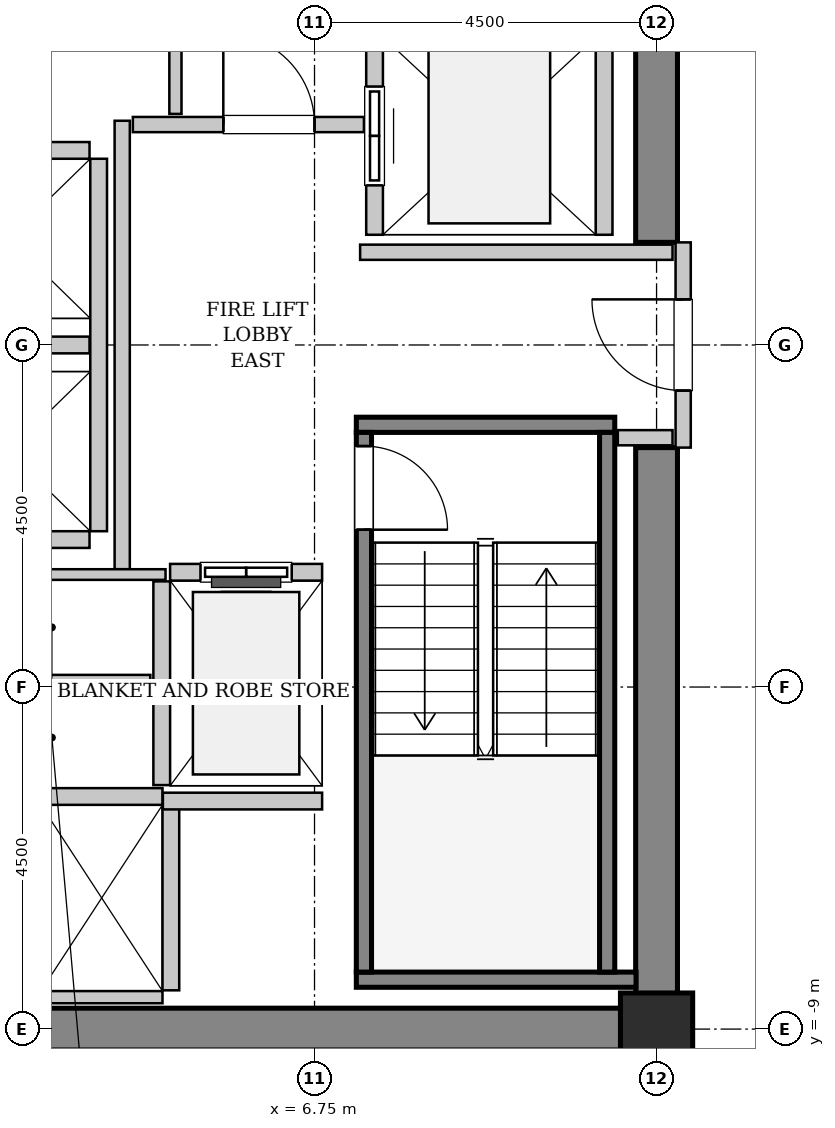
"""IFC4 building model, lengths in metres.
Left out: names, types, materials, properties, quantities, classifications, styles, units other than length and angle.
Written with IfcOpenShell. Run it as: python <this file> out.ifc"""

import sys

from ifc_helpers import new_model, si_unit, direction, frame, frame_2d, origin, origin_2d, place, context, subcontext, project, spatial, rectangle, hollow_rectangle, extrude, source, transform, mapped, element, fill, save


model = new_model("IFC4")
c1 = context("Model", 3, precision=1e-05, world=origin(), true_north=direction((0.0, 1.0)))
c2 = subcontext(c1, "Body", "Model", "MODEL_VIEW")
j1 = project(units=[si_unit("LENGTHUNIT", "METRE"), si_unit("PLANEANGLEUNIT", "RADIAN")], contexts=[c1])
p1 = place(None, origin())
s1 = spatial("IfcSite", under=j1, at=p1, CompositionType="ELEMENT")
p2 = place(p1, origin())
s2 = spatial("IfcBuilding", under=s1, at=p2, CompositionType="ELEMENT")
p3 = place(p2, frame((0.0, 0.0, 106.0)))
s3 = spatial("IfcBuildingStorey", under=s2, at=p3, CompositionType="ELEMENT", Elevation=106.0)
m1 = source(origin(), c2, "Body", "SweptSolid", [
    extrude(rectangle(XDim=9.975, YDim=0.55, at=frame_2d((4.987, 0.0))), origin(), (0.0, 0.0, 1.0), 3.8),
])
p4 = place(p3, frame((1.55, -9.0, 0.0), z_axis=(0.0, 0.0, 1.0), x_axis=(1.0, 0.0, 0.0)))
e1 = element("IfcWall", 1, at=p4, inside=s3, PredefinedType="SHEAR", context=c2, shape_type="MappedRepresentation", body=[
    mapped(m1, transform((0.0, 0.0, 0.0), x_axis=(1.0, 0.0, 0.0), y_axis=(0.0, 1.0, 0.0), z_axis=(0.0, 0.0, 1.0), scale=1.0)),
])
m2 = source(origin(), c2, "Body", "SweptSolid", [
    extrude(rectangle(XDim=7.375, YDim=0.55, at=frame_2d((3.688, 0.0))), origin(), (0.0, 0.0, 1.0), 3.8),
])
for number, where, z_axis, x_axis in (
    (2, (11.25, -8.725, 0.0), (0.0, 0.0, 1.0), (0.0, 1.0, 0.0)),
    (3, (11.25, 1.35, 0.0), (0.0, 0.0, 1.0), (0.0, 1.0, 0.0)),
):
    element("IfcWall", number, at=place(p3, frame(where, z_axis=z_axis, x_axis=x_axis)), inside=s3, PredefinedType="SHEAR", context=c2, shape_type="MappedRepresentation", body=[
        mapped(m2, transform((0.0, 0.0, 0.0), x_axis=(1.0, 0.0, 0.0), y_axis=(0.0, 1.0, 0.0), z_axis=(0.0, 0.0, 1.0), scale=1.0)),
    ])
m3 = source(origin(), c2, "Body", "SweptSolid", [
    extrude(hollow_rectangle(XDim=0.95, YDim=0.95, WallThickness=0.045, InnerFilletRadius=0.045, OuterFilletRadius=0.09, at=origin_2d()), origin(), (0.0, 0.0, 1.0), 3.8),
])
p5 = place(p3, frame((11.25, -9.0, 0.0), z_axis=(0.0, 0.0, 1.0), x_axis=(1.0, 0.0, 0.0)))
e4 = element("IfcColumn", 4, at=p5, inside=s3, PredefinedType="COLUMN", context=c2, shape_type="MappedRepresentation", body=[
    mapped(m3, transform((0.0, 0.0, 0.0), x_axis=(1.0, 0.0, 0.0), y_axis=(0.0, 1.0, 0.0), z_axis=(0.0, 0.0, 1.0), scale=1.0)),
])
m4 = source(origin(), c2, "Body", "SweptSolid", [
    extrude(rectangle(XDim=3.4, YDim=0.2, at=frame_2d((1.7, 0.0))), origin(), (0.0, 0.0, 1.0), 3.8),
])
p6 = place(p3, frame((7.3, -1.05, 0.0), z_axis=(0.0, 0.0, 1.0), x_axis=(1.0, 0.0, 0.0)))
e5 = element("IfcWall", 5, at=p6, inside=s3, PredefinedType="SOLIDWALL", context=c2, shape_type="MappedRepresentation", body=[
    mapped(m4, transform((0.0, 0.0, 0.0), x_axis=(1.0, 0.0, 0.0), y_axis=(0.0, 1.0, 0.0), z_axis=(0.0, 0.0, 1.0), scale=1.0)),
])
m5 = source(origin(), c2, "Body", "SweptSolid", [
    extrude(rectangle(XDim=3.68, YDim=0.2, at=frame_2d((1.84, 0.0))), origin(), (0.0, 0.0, 1.0), 3.8),
])
p7 = place(p3, frame((7.3, -8.35, 0.0), z_axis=(0.0, 0.0, 1.0), x_axis=(1.0, 0.0, 0.0)))
e6 = element("IfcWall", 6, at=p7, inside=s3, PredefinedType="SOLIDWALL", context=c2, shape_type="MappedRepresentation", body=[
    mapped(m5, transform((0.0, 0.0, 0.0), x_axis=(1.0, 0.0, 0.0), y_axis=(0.0, 1.0, 0.0), z_axis=(0.0, 0.0, 1.0), scale=1.0)),
])
m6 = source(origin(), c2, "Body", "SweptSolid", [
    extrude(rectangle(XDim=7.1, YDim=0.2, at=frame_2d((3.55, 0.0))), origin(), (0.0, 0.0, 1.0), 3.8),
])
p8 = place(p3, frame((7.4, -1.15, 0.0), z_axis=(0.0, 0.0, 1.0), x_axis=(0.0, -1.0, 0.0)))
e7 = element("IfcWall", 7, at=p8, inside=s3, PredefinedType="SOLIDWALL", context=c2, shape_type="MappedRepresentation", body=[
    mapped(m6, transform((0.0, 0.0, 0.0), x_axis=(1.0, 0.0, 0.0), y_axis=(0.0, 1.0, 0.0), z_axis=(0.0, 0.0, 1.0), scale=1.0)),
])
p9 = place(p8, frame((0.18, 0.0, 0.0)))
e8 = element("IfcOpeningElement", 8, at=p9, cuts=e7, PredefinedType="OPENING", context=c2, shape_type="SweptSolid", body=[
    extrude(rectangle(XDim=1.1, YDim=2.15, at=frame_2d((0.55, 1.075))), frame((0.0, 0.11, 0.0), z_axis=(0.0, -1.0, 0.0), x_axis=(1.0, 0.0, 0.0)), (0.0, 0.0, 1.0), 0.22),
])
p10 = place(p3, frame((10.6, -1.15, 0.0), z_axis=(0.0, 0.0, 1.0), x_axis=(0.0, -1.0, 0.0)))
e9 = element("IfcWall", 9, at=p10, inside=s3, PredefinedType="SOLIDWALL", context=c2, shape_type="MappedRepresentation", body=[
    mapped(m6, transform((0.0, 0.0, 0.0), x_axis=(1.0, 0.0, 0.0), y_axis=(0.0, 1.0, 0.0), z_axis=(0.0, 0.0, 1.0), scale=1.0)),
])
m7 = source(origin(), c2, "Body", "SweptSolid", [
    extrude(rectangle(XDim=2.0, YDim=0.22, at=frame_2d((1.0, 0.0))), origin(), (0.0, 0.0, 1.0), 3.535),
])
p11 = place(p3, frame((6.85, -2.99, 0.0), z_axis=(0.0, 0.0, 1.0), x_axis=(-1.0, 0.0, 0.0)))
e10 = element("IfcWall", 10, at=p11, inside=s3, PredefinedType="SOLIDWALL", context=c2, shape_type="MappedRepresentation", body=[
    mapped(m7, transform((0.0, 0.0, 0.0), x_axis=(1.0, 0.0, 0.0), y_axis=(0.0, 1.0, 0.0), z_axis=(0.0, 0.0, 1.0), scale=1.0)),
])
p12 = place(p11, frame((0.4, 0.0, 0.0)))
e11 = element("IfcOpeningElement", 11, at=p12, cuts=e10, PredefinedType="OPENING", context=c2, shape_type="SweptSolid", body=[
    extrude(rectangle(XDim=1.2, YDim=2.2, at=frame_2d((0.6, 1.1))), frame((0.0, 0.12, 0.0), z_axis=(0.0, -1.0, 0.0), x_axis=(1.0, 0.0, 0.0)), (0.0, 0.0, 1.0), 0.24),
])
m8 = source(origin(), c2, "Body", "SweptSolid", [
    extrude(rectangle(XDim=2.68, YDim=0.22, at=frame_2d((1.34, 0.0))), origin(), (0.0, 0.0, 1.0), 3.535),
])
p13 = place(p3, frame((4.74, -3.11, 0.0), z_axis=(0.0, 0.0, 1.0), x_axis=(0.0, -1.0, 0.0)))
e12 = element("IfcWall", 12, at=p13, inside=s3, PredefinedType="SOLIDWALL", context=c2, shape_type="MappedRepresentation", body=[
    mapped(m8, transform((0.0, 0.0, 0.0), x_axis=(1.0, 0.0, 0.0), y_axis=(0.0, 1.0, 0.0), z_axis=(0.0, 0.0, 1.0), scale=1.0)),
])
m9 = source(origin(), c2, "Body", "SweptSolid", [
    extrude(rectangle(XDim=5.45, YDim=0.22, at=frame_2d((2.725, 0.0))), origin(), (0.0, 0.0, 1.0), 3.535),
])
p14 = place(p3, frame((7.54, 6.9, 0.0), z_axis=(0.0, 0.0, 1.0), x_axis=(0.0, -1.0, 0.0)))
e13 = element("IfcWall", 13, at=p14, inside=s3, PredefinedType="SOLIDWALL", context=c2, shape_type="MappedRepresentation", body=[
    mapped(m9, transform((0.0, 0.0, 0.0), x_axis=(1.0, 0.0, 0.0), y_axis=(0.0, 1.0, 0.0), z_axis=(0.0, 0.0, 1.0), scale=1.0)),
])
p15 = place(p14, frame((3.5, 0.0, 0.0)))
e14 = element("IfcOpeningElement", 14, at=p15, cuts=e13, PredefinedType="OPENING", context=c2, shape_type="SweptSolid", body=[
    extrude(rectangle(XDim=1.3, YDim=2.3, at=frame_2d((0.65, 1.15))), frame((0.0, 0.12, 0.0), z_axis=(0.0, -1.0, 0.0), x_axis=(1.0, 0.0, 0.0)), (0.0, 0.0, 1.0), 0.24),
])
p16 = place(p14, frame((0.65, 0.0, 0.0)))
e15 = element("IfcOpeningElement", 15, at=p16, cuts=e13, PredefinedType="OPENING", context=c2, shape_type="SweptSolid", body=[
    extrude(rectangle(XDim=1.3, YDim=2.3, at=frame_2d((0.65, 1.15))), frame((0.0, 0.12, 0.0), z_axis=(0.0, -1.0, 0.0), x_axis=(1.0, 0.0, 0.0)), (0.0, 0.0, 1.0), 0.24),
])
p17 = place(p3, frame((10.56, 1.45, 0.0), z_axis=(0.0, 0.0, 1.0), x_axis=(0.0, 1.0, 0.0)))
e16 = element("IfcWall", 16, at=p17, inside=s3, PredefinedType="SOLIDWALL", context=c2, shape_type="MappedRepresentation", body=[
    mapped(m9, transform((0.0, 0.0, 0.0), x_axis=(1.0, 0.0, 0.0), y_axis=(0.0, 1.0, 0.0), z_axis=(0.0, 0.0, 1.0), scale=1.0)),
])
m10 = source(origin(), c2, "Body", "SweptSolid", [
    extrude(rectangle(XDim=3.2, YDim=0.22, at=frame_2d((1.6, 0.0))), origin(), (0.0, 0.0, 1.0), 3.535),
])
p18 = place(p3, frame((4.75, -5.94, 0.0), z_axis=(0.0, 0.0, 1.0), x_axis=(-1.0, 0.0, 0.0)))
e17 = element("IfcWall", 17, at=p18, inside=s3, PredefinedType="SOLIDWALL", context=c2, shape_type="MappedRepresentation", body=[
    mapped(m10, transform((0.0, 0.0, 0.0), x_axis=(1.0, 0.0, 0.0), y_axis=(0.0, 1.0, 0.0), z_axis=(0.0, 0.0, 1.0), scale=1.0)),
])
m11 = source(origin(), c2, "Body", "SweptSolid", [
    extrude(rectangle(XDim=3.2, YDim=0.16, at=frame_2d((1.6, 0.0))), origin(), (0.0, 0.0, 1.0), 2.425),
])
p19 = place(p3, frame((1.55, -8.58, 0.0), z_axis=(0.0, 0.0, 1.0), x_axis=(1.0, 0.0, 0.0)))
e18 = element("IfcWall", 18, at=p19, inside=s3, PredefinedType="PARTITIONING", context=c2, shape_type="MappedRepresentation", body=[
    mapped(m11, transform((0.0, 0.0, 0.0), x_axis=(1.0, 0.0, 0.0), y_axis=(0.0, 1.0, 0.0), z_axis=(0.0, 0.0, 1.0), scale=1.0)),
])
m12 = source(origin(), c2, "Body", "SweptSolid", [
    extrude(rectangle(XDim=2.43, YDim=0.22, at=frame_2d((1.215, 0.0))), origin(), (0.0, 0.0, 1.0), 3.535),
])
p20 = place(p3, frame((4.86, -8.49, 0.0), z_axis=(0.0, 0.0, 1.0), x_axis=(0.0, 1.0, 0.0)))
e19 = element("IfcWall", 19, at=p20, inside=s3, PredefinedType="SOLIDWALL", context=c2, shape_type="MappedRepresentation", body=[
    mapped(m12, transform((0.0, 0.0, 0.0), x_axis=(1.0, 0.0, 0.0), y_axis=(0.0, 1.0, 0.0), z_axis=(0.0, 0.0, 1.0), scale=1.0)),
])
m13 = source(origin(), c2, "Body", "SweptSolid", [
    extrude(rectangle(XDim=4.9, YDim=0.22, at=frame_2d((2.45, 0.0))), origin(), (0.0, 0.0, 1.0), 3.535),
])
p21 = place(p3, frame((3.91, -2.45, 0.0), z_axis=(0.0, 0.0, 1.0), x_axis=(0.0, 1.0, 0.0)))
e20 = element("IfcWall", 20, at=p21, inside=s3, PredefinedType="SOLIDWALL", context=c2, shape_type="MappedRepresentation", body=[
    mapped(m13, transform((0.0, 0.0, 0.0), x_axis=(1.0, 0.0, 0.0), y_axis=(0.0, 1.0, 0.0), z_axis=(0.0, 0.0, 1.0), scale=1.0)),
])
m14 = source(origin(), c2, "Body", "SweptSolid", [
    extrude(rectangle(XDim=2.13, YDim=0.22, at=frame_2d((1.065, 0.0))), origin(), (0.0, 0.0, 1.0), 3.535),
])
for number, where, z_axis, x_axis in (
    (21, (1.66, -2.56, 0.0), (0.0, 0.0, 1.0), (1.0, 0.0, 0.0)),
    (22, (1.66, 0.0, 0.0), (0.0, 0.0, 1.0), (1.0, 0.0, 0.0)),
    (23, (3.79, 2.56, 0.0), (0.0, 0.0, 1.0), (-1.0, 0.0, 0.0)),
):
    element("IfcWall", number, at=place(p3, frame(where, z_axis=z_axis, x_axis=x_axis)), inside=s3, PredefinedType="SOLIDWALL", context=c2, shape_type="MappedRepresentation", body=[
        mapped(m14, transform((0.0, 0.0, 0.0), x_axis=(1.0, 0.0, 0.0), y_axis=(0.0, 1.0, 0.0), z_axis=(0.0, 0.0, 1.0), scale=1.0)),
    ])
m15 = source(origin(), c2, "Body", "SweptSolid", [
    extrude(rectangle(XDim=2.095, YDim=0.22, at=frame_2d((1.048, 0.0))), origin(), (0.0, 0.0, 1.0), 3.535),
])
p22 = place(p3, frame((4.755, -6.0, 0.0), z_axis=(0.0, 0.0, 1.0), x_axis=(1.0, 0.0, 0.0)))
e24 = element("IfcWall", 24, at=p22, inside=s3, PredefinedType="SOLIDWALL", context=c2, shape_type="MappedRepresentation", body=[
    mapped(m15, transform((0.0, 0.0, 0.0), x_axis=(1.0, 0.0, 0.0), y_axis=(0.0, 1.0, 0.0), z_axis=(0.0, 0.0, 1.0), scale=1.0)),
])
m16 = source(origin(), c2, "Body", "SweptSolid", [
    extrude(rectangle(XDim=2.7, YDim=0.2, at=frame_2d((1.35, 0.0))), origin(), (0.0, 0.0, 1.0), 2.425),
])
p23 = place(p3, frame((11.6, -1.35, 0.0), z_axis=(0.0, 0.0, 1.0), x_axis=(0.0, 1.0, 0.0)))
e25 = element("IfcWall", 25, at=p23, inside=s3, PredefinedType="PARTITIONING", context=c2, shape_type="MappedRepresentation", body=[
    mapped(m16, transform((0.0, 0.0, 0.0), x_axis=(1.0, 0.0, 0.0), y_axis=(0.0, 1.0, 0.0), z_axis=(0.0, 0.0, 1.0), scale=1.0)),
])
p24 = place(p23, frame((0.75, 0.0, 0.0)))
e26 = element("IfcOpeningElement", 26, at=p24, cuts=e25, PredefinedType="OPENING", context=c2, shape_type="SweptSolid", body=[
    extrude(rectangle(XDim=1.2, YDim=2.15, at=frame_2d((0.6, 1.075))), frame((0.0, 0.11, 0.0), z_axis=(0.0, -1.0, 0.0), x_axis=(1.0, 0.0, 0.0)), (0.0, 0.0, 1.0), 0.22),
])
m17 = source(origin(), c2, "Body", "SweptSolid", [
    extrude(rectangle(XDim=5.9, YDim=0.2, at=frame_2d((2.95, 0.0))), origin(), (0.0, 0.0, 1.0), 3.535),
])
p25 = place(p3, frame((4.22, -2.95, 0.0), z_axis=(0.0, 0.0, 1.0), x_axis=(0.0, 1.0, 0.0)))
e27 = element("IfcWall", 27, at=p25, inside=s3, PredefinedType="PARTITIONING", context=c2, shape_type="MappedRepresentation", body=[
    mapped(m17, transform((0.0, 0.0, 0.0), x_axis=(1.0, 0.0, 0.0), y_axis=(0.0, 1.0, 0.0), z_axis=(0.0, 0.0, 1.0), scale=1.0)),
])
m18 = source(origin(), c2, "Body", "SweptSolid", [
    extrude(rectangle(XDim=3.04, YDim=0.2, at=frame_2d((1.52, 0.0))), origin(), (0.0, 0.0, 1.0), 3.535),
])
p26 = place(p3, frame((4.36, 2.9, 0.0), z_axis=(0.0, 0.0, 1.0), x_axis=(1.0, 0.0, 0.0)))
e28 = element("IfcWall", 28, at=p26, inside=s3, PredefinedType="PARTITIONING", context=c2, shape_type="MappedRepresentation", body=[
    mapped(m18, transform((0.0, 0.0, 0.0), x_axis=(1.0, 0.0, 0.0), y_axis=(0.0, 1.0, 0.0), z_axis=(0.0, 0.0, 1.0), scale=1.0)),
])
p27 = place(p26, frame((1.19, 0.0, 0.0)))
e29 = element("IfcOpeningElement", 29, at=p27, cuts=e28, PredefinedType="OPENING", context=c2, shape_type="SweptSolid", body=[
    extrude(rectangle(XDim=1.2, YDim=2.15, at=frame_2d((0.6, 1.075))), frame((0.0, 0.11, 0.0), z_axis=(0.0, -1.0, 0.0), x_axis=(1.0, 0.0, 0.0)), (0.0, 0.0, 1.0), 0.22),
])
m19 = source(origin(), c2, "Body", "SweptSolid", [
    extrude(rectangle(XDim=4.11, YDim=0.2, at=frame_2d((2.055, 0.0))), origin(), (0.0, 0.0, 1.0), 3.535),
])
p28 = place(p3, frame((7.35, 1.22, 0.0), z_axis=(0.0, 0.0, 1.0), x_axis=(1.0, 0.0, 0.0)))
e30 = element("IfcWall", 30, at=p28, inside=s3, PredefinedType="PARTITIONING", context=c2, shape_type="MappedRepresentation", body=[
    mapped(m19, transform((0.0, 0.0, 0.0), x_axis=(1.0, 0.0, 0.0), y_axis=(0.0, 1.0, 0.0), z_axis=(0.0, 0.0, 1.0), scale=1.0)),
])
m20 = source(origin(), c2, "Body", "SweptSolid", [
    extrude(rectangle(XDim=0.72, YDim=0.2, at=frame_2d((0.36, 0.0))), origin(), (0.0, 0.0, 1.0), 3.535),
])
p29 = place(p3, frame((10.74, -1.22, 0.0), z_axis=(0.0, 0.0, 1.0), x_axis=(1.0, 0.0, 0.0)))
e31 = element("IfcWall", 31, at=p29, inside=s3, PredefinedType="PARTITIONING", context=c2, shape_type="MappedRepresentation", body=[
    mapped(m20, transform((0.0, 0.0, 0.0), x_axis=(1.0, 0.0, 0.0), y_axis=(0.0, 1.0, 0.0), z_axis=(0.0, 0.0, 1.0), scale=1.0)),
])
m21 = source(origin(), c2, "Body", "SweptSolid", [
    extrude(rectangle(XDim=3.015, YDim=0.16, at=frame_2d((1.507, 0.0))), origin(), (0.0, 0.0, 1.0), 3.535),
])
p30 = place(p3, frame((4.92, 3.04, 0.0), z_axis=(0.0, 0.0, 1.0), x_axis=(0.0, 1.0, 0.0)))
e32 = element("IfcWall", 32, at=p30, inside=s3, PredefinedType="PARTITIONING", context=c2, shape_type="MappedRepresentation", body=[
    mapped(m21, transform((0.0, 0.0, 0.0), x_axis=(1.0, 0.0, 0.0), y_axis=(0.0, 1.0, 0.0), z_axis=(0.0, 0.0, 1.0), scale=1.0)),
])
m22 = source(origin(), c2, "Body", "SweptSolid", [
    extrude(rectangle(XDim=3.15, YDim=0.14, at=frame_2d((1.575, 0.0))), origin(), (0.0, 0.0, 1.0), 3.535),
])
p31 = place(p3, frame((1.64, -3.02, 0.0), z_axis=(0.0, 0.0, 1.0), x_axis=(1.0, 0.0, 0.0)))
e33 = element("IfcWall", 33, at=p31, inside=s3, PredefinedType="PARTITIONING", context=c2, shape_type="MappedRepresentation", body=[
    mapped(m22, transform((0.0, 0.0, 0.0), x_axis=(1.0, 0.0, 0.0), y_axis=(0.0, 1.0, 0.0), z_axis=(0.0, 0.0, 1.0), scale=1.0)),
])
m23 = source(origin(), c2, "Body", "SweptSolid", [
    extrude(rectangle(XDim=2.95, YDim=0.14, at=frame_2d((1.475, 0.0))), origin(), (0.0, 0.0, 1.0), 3.535),
])
p32 = place(p3, frame((1.64, -4.41, 0.0), z_axis=(0.0, 0.0, 1.0), x_axis=(1.0, 0.0, 0.0)))
e34 = element("IfcWall", 34, at=p32, inside=s3, PredefinedType="PARTITIONING", context=c2, shape_type="MappedRepresentation", body=[
    mapped(m23, transform((0.0, 0.0, 0.0), x_axis=(1.0, 0.0, 0.0), y_axis=(0.0, 1.0, 0.0), z_axis=(0.0, 0.0, 1.0), scale=1.0)),
])
m24 = source(origin(), c2, "Body", "SweptSolid", [
    extrude(rectangle(XDim=1.1, YDim=2.15, at=frame_2d((0.55, 1.075))), frame((0.0, 0.025, 0.0), z_axis=(0.0, -1.0, 0.0), x_axis=(1.0, 0.0, 0.0)), (0.0, 0.0, 1.0), 0.05),
])
p33 = place(p9, origin())
e35 = element("IfcDoor", 35, at=p33, inside=s3, OperationType="SINGLE_SWING_RIGHT", PredefinedType="DOOR", context=c2, shape_type="MappedRepresentation", body=[
    mapped(m24, transform((0.0, 0.0, 0.0), x_axis=(1.0, 0.0, 0.0), y_axis=(0.0, 1.0, 0.0), z_axis=(0.0, 0.0, 1.0), scale=1.0)),
])
fill(e8, e35)
m25 = source(origin(), c2, "Body", "SweptSolid", [
    extrude(rectangle(XDim=1.2, YDim=2.2, at=frame_2d((0.6, 1.1))), frame((0.0, 0.025, 0.0), z_axis=(0.0, -1.0, 0.0), x_axis=(1.0, 0.0, 0.0)), (0.0, 0.0, 1.0), 0.05),
])
p34 = place(p12, origin())
e36 = element("IfcDoor", 36, at=p34, inside=s3, OperationType="SLIDING_TO_LEFT", PredefinedType="DOOR", context=c2, shape_type="MappedRepresentation", body=[
    mapped(m25, transform((0.0, 0.0, 0.0), x_axis=(1.0, 0.0, 0.0), y_axis=(0.0, 1.0, 0.0), z_axis=(0.0, 0.0, 1.0), scale=1.0)),
])
fill(e11, e36)
m26 = source(origin(), c2, "Body", "SweptSolid", [
    extrude(rectangle(XDim=1.3, YDim=2.3, at=frame_2d((0.65, 1.15))), frame((0.0, 0.025, 0.0), z_axis=(0.0, -1.0, 0.0), x_axis=(1.0, 0.0, 0.0)), (0.0, 0.0, 1.0), 0.05),
])
p35 = place(p15, origin())
e37 = element("IfcDoor", 37, at=p35, inside=s3, OperationType="SLIDING_TO_RIGHT", PredefinedType="DOOR", context=c2, shape_type="MappedRepresentation", body=[
    mapped(m26, transform((0.0, 0.0, 0.0), x_axis=(1.0, 0.0, 0.0), y_axis=(0.0, 1.0, 0.0), z_axis=(0.0, 0.0, 1.0), scale=1.0)),
])
fill(e14, e37)
m27 = source(origin(), c2, "Body", "SweptSolid", [
    extrude(rectangle(XDim=1.2, YDim=2.15, at=frame_2d((0.6, 1.075))), frame((0.0, 0.025, 0.0), z_axis=(0.0, -1.0, 0.0), x_axis=(1.0, 0.0, 0.0)), (0.0, 0.0, 1.0), 0.05),
])
p36 = place(p24, origin())
e38 = element("IfcDoor", 38, at=p36, inside=s3, OperationType="SINGLE_SWING_RIGHT", PredefinedType="DOOR", context=c2, shape_type="MappedRepresentation", body=[
    mapped(m27, transform((0.0, 0.0, 0.0), x_axis=(1.0, 0.0, 0.0), y_axis=(0.0, 1.0, 0.0), z_axis=(0.0, 0.0, 1.0), scale=1.0)),
])
fill(e26, e38)
p37 = place(p27, origin())
e39 = element("IfcDoor", 39, at=p37, inside=s3, OperationType="SINGLE_SWING_LEFT", PredefinedType="DOOR", context=c2, shape_type="MappedRepresentation", body=[
    mapped(m27, transform((0.0, 0.0, 0.0), x_axis=(1.0, 0.0, 0.0), y_axis=(0.0, 1.0, 0.0), z_axis=(0.0, 0.0, 1.0), scale=1.0)),
])
fill(e29, e39)
save(model, sys.argv[1])
